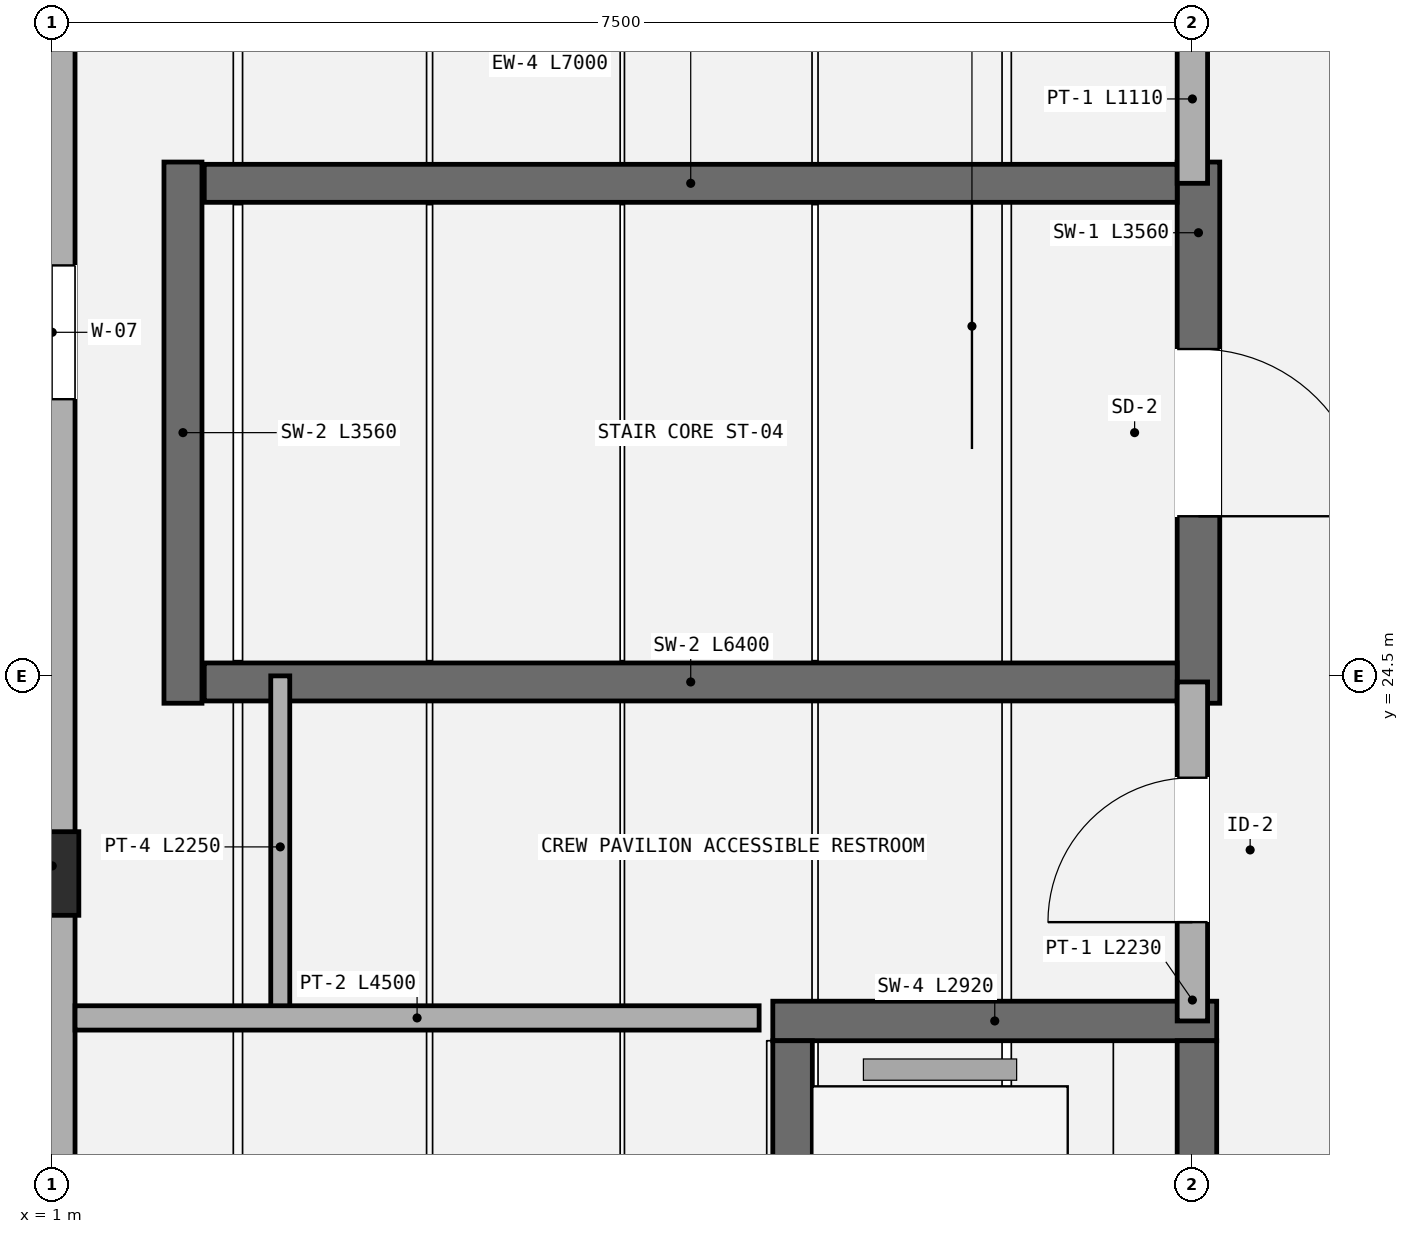
"""IFC4 building model, lengths in metres.
Left out: names, types, materials, properties, quantities, classifications, styles, units other than length and angle.
Written with IfcOpenShell. Run it as: python <this file> out.ifc"""

import sys

from ifc_helpers import new_model, si_unit, direction, frame, frame_2d, origin, origin_2d, place, context, subcontext, project, spatial, rectangle, extrude, element, fill, save


model = new_model("IFC4")
c1 = context("Model", 3, precision=1e-05, world=origin(), true_north=direction((0.0, 1.0)))
c2 = subcontext(c1, "Body", "Model", "MODEL_VIEW")
j1 = project(units=[si_unit("LENGTHUNIT", "METRE"), si_unit("PLANEANGLEUNIT", "RADIAN")], contexts=[c1])
p1 = place(None, origin())
s1 = spatial("IfcSite", under=j1, at=p1, CompositionType="ELEMENT")
p2 = place(p1, origin())
s2 = spatial("IfcBuilding", under=s1, at=p2, CompositionType="ELEMENT")
p3 = place(p2, frame((0.0, 0.0, 12.75)))
s3 = spatial("IfcBuildingStorey", under=s2, at=p3, CompositionType="ELEMENT", Elevation=12.75)
p4 = place(p3, frame((1.0, 23.2, 0.0), z_axis=(0.0, 0.0, 1.0), x_axis=(1.0, 0.0, 0.0)))
e1 = element("IfcColumn", 1, at=p4, inside=s3, PredefinedType="PILASTER", context=c2, shape_type="SweptSolid", body=[
    extrude(rectangle(XDim=0.35, YDim=0.55, at=origin_2d()), origin(), (0.0, 0.0, 1.0), 2.9),
])
p5 = place(p3, frame((1.0, 28.75, 0.0), z_axis=(0.0, 0.0, 1.0), x_axis=(0.0, -1.0, 0.0)))
e2 = element("IfcWall", 2, at=p5, inside=s3, PredefinedType="STANDARD", context=c2, shape_type="SweptSolid", body=[
    extrude(rectangle(XDim=11.0, YDim=0.3, at=frame_2d((5.5, 0.0))), origin(), (0.0, 0.0, 1.0), 2.25),
])
p6 = place(p5, frame((1.55, 0.0, 0.51)))
e3 = element("IfcOpeningElement", 3, at=p6, cuts=e2, PredefinedType="OPENING", context=c2, shape_type="SweptSolid", body=[
    extrude(rectangle(XDim=0.88, YDim=1.5, at=frame_2d((0.44, 0.75))), frame((0.0, 0.16, 0.0), z_axis=(0.0, -1.0, 0.0), x_axis=(1.0, 0.0, 0.0)), (0.0, 0.0, 1.0), 0.32),
])
p7 = place(p5, frame((8.25, 0.0, 0.61)))
e4 = element("IfcOpeningElement", 4, at=p7, cuts=e2, PredefinedType="OPENING", context=c2, shape_type="SweptSolid", body=[
    extrude(rectangle(XDim=1.3, YDim=1.4, at=frame_2d((0.65, 0.7))), frame((0.0, 0.16, 0.0), z_axis=(0.0, -1.0, 0.0), x_axis=(1.0, 0.0, 0.0)), (0.0, 0.0, 1.0), 0.32),
])
p8 = place(p3, frame((8.54, 27.88, 0.0), z_axis=(0.0, 0.0, 1.0), x_axis=(0.0, -1.0, 0.0)))
e5 = element("IfcWall", 5, at=p8, inside=s3, PredefinedType="SHEAR", context=c2, shape_type="SweptSolid", body=[
    extrude(rectangle(XDim=3.56, YDim=0.28, at=frame_2d((1.78, 0.0))), origin(), (0.0, 0.0, 1.0), 2.8),
])
p9 = place(p8, frame((1.23, 0.0, 0.0)))
e6 = element("IfcOpeningElement", 6, at=p9, cuts=e5, PredefinedType="OPENING", context=c2, shape_type="SweptSolid", body=[
    extrude(rectangle(XDim=1.1, YDim=2.15, at=frame_2d((0.55, 1.075))), frame((0.0, 0.15, 0.0), z_axis=(0.0, -1.0, 0.0), x_axis=(1.0, 0.0, 0.0)), (0.0, 0.0, 1.0), 0.3),
])
p10 = place(p3, frame((1.86, 24.32, 0.0), z_axis=(0.0, 0.0, 1.0), x_axis=(0.0, 1.0, 0.0)))
e7 = element("IfcWall", 7, at=p10, inside=s3, PredefinedType="SHEAR", context=c2, shape_type="SweptSolid", body=[
    extrude(rectangle(XDim=3.56, YDim=0.25, at=frame_2d((1.78, 0.0))), origin(), (0.0, 0.0, 1.0), 2.8),
])
for number, where, z_axis, x_axis in (
    (8, (8.4, 27.74, 0.0), (0.0, 0.0, 1.0), (-1.0, 0.0, 0.0)),
    (9, (2.0, 24.46, 0.0), (0.0, 0.0, 1.0), (1.0, 0.0, 0.0)),
):
    element("IfcWall", number, at=place(p3, frame(where, z_axis=z_axis, x_axis=x_axis)), inside=s3, PredefinedType="SHEAR", context=c2, shape_type="SweptSolid", body=[
        extrude(rectangle(XDim=6.4, YDim=0.25, at=frame_2d((3.2, 0.0))), origin(), (0.0, 0.0, 1.0), 2.8),
    ])
p11 = place(p3, frame((8.66, 22.23, 0.0), z_axis=(0.0, 0.0, 1.0), x_axis=(-1.0, 0.0, 0.0)))
e10 = element("IfcWall", 10, at=p11, inside=s3, PredefinedType="SHEAR", context=c2, shape_type="SweptSolid", body=[
    extrude(rectangle(XDim=2.92, YDim=0.26, at=frame_2d((1.46, 0.0))), origin(), (0.0, 0.0, 1.0), 2.8),
])
p12 = place(p3, frame((5.87, 22.1, 0.0), z_axis=(0.0, 0.0, 1.0), x_axis=(0.0, -1.0, 0.0)))
e11 = element("IfcWall", 11, at=p12, inside=s3, PredefinedType="SHEAR", context=c2, shape_type="SweptSolid", body=[
    extrude(rectangle(XDim=3.0, YDim=0.26, at=frame_2d((1.5, 0.0))), origin(), (0.0, 0.0, 1.0), 2.8),
])
p13 = place(p3, frame((8.53, 19.1, 0.0), z_axis=(0.0, 0.0, 1.0), x_axis=(0.0, 1.0, 0.0)))
e12 = element("IfcWall", 12, at=p13, inside=s3, PredefinedType="SHEAR", context=c2, shape_type="SweptSolid", body=[
    extrude(rectangle(XDim=3.0, YDim=0.26, at=frame_2d((1.5, 0.0))), origin(), (0.0, 0.0, 1.0), 2.8),
])
p14 = place(p13, frame((0.95, 0.0, 0.0)))
e13 = element("IfcOpeningElement", 13, at=p14, cuts=e12, PredefinedType="OPENING", context=c2, shape_type="SweptSolid", body=[
    extrude(rectangle(XDim=1.1, YDim=2.15, at=frame_2d((0.55, 1.075))), frame((0.0, 0.14, 0.0), z_axis=(0.0, -1.0, 0.0), x_axis=(1.0, 0.0, 0.0)), (0.0, 0.0, 1.0), 0.28),
])
p15 = place(p3, frame((8.5, 22.23, 0.0), z_axis=(0.0, 0.0, 1.0), x_axis=(0.0, 1.0, 0.0)))
e14 = element("IfcWall", 14, at=p15, inside=s3, PredefinedType="PARTITIONING", context=c2, shape_type="SweptSolid", body=[
    extrude(rectangle(XDim=2.23, YDim=0.2, at=frame_2d((1.115, 0.0))), origin(), (0.0, 0.0, 1.0), 2.15),
])
p16 = place(p15, frame((0.65, 0.0, 0.0)))
e15 = element("IfcOpeningElement", 15, at=p16, cuts=e14, PredefinedType="OPENING", context=c2, shape_type="SweptSolid", body=[
    extrude(rectangle(XDim=0.95, YDim=2.1, at=frame_2d((0.475, 1.05))), frame((0.0, 0.11, 0.0), z_axis=(0.0, -1.0, 0.0), x_axis=(1.0, 0.0, 0.0)), (0.0, 0.0, 1.0), 0.22),
])
p17 = place(p3, frame((8.5, 27.74, 0.0), z_axis=(0.0, 0.0, 1.0), x_axis=(0.0, 1.0, 0.0)))
e16 = element("IfcWall", 16, at=p17, inside=s3, PredefinedType="PARTITIONING", context=c2, shape_type="SweptSolid", body=[
    extrude(rectangle(XDim=1.11, YDim=0.2, at=frame_2d((0.555, 0.0))), origin(), (0.0, 0.0, 1.0), 2.15),
])
p18 = place(p3, frame((2.5, 22.25, 0.0), z_axis=(0.0, 0.0, 1.0), x_axis=(0.0, 1.0, 0.0)))
e17 = element("IfcWall", 17, at=p18, inside=s3, PredefinedType="PARTITIONING", context=c2, shape_type="SweptSolid", body=[
    extrude(rectangle(XDim=2.25, YDim=0.125, at=frame_2d((1.125, 0.0))), origin(), (0.0, 0.0, 1.0), 2.15),
])
p19 = place(p3, frame((1.15, 22.25, 0.0), z_axis=(0.0, 0.0, 1.0), x_axis=(1.0, 0.0, 0.0)))
e18 = element("IfcWall", 18, at=p19, inside=s3, PredefinedType="PARTITIONING", context=c2, shape_type="SweptSolid", body=[
    extrude(rectangle(XDim=4.5, YDim=0.16, at=frame_2d((2.25, 0.0))), origin(), (0.0, 0.0, 1.0), 2.15),
])
p20 = place(p6, origin())
e19 = element("IfcWindow", 19, at=p20, inside=s3, PartitioningType="SINGLE_PANEL", PredefinedType="WINDOW", context=c2, shape_type="SweptSolid", body=[
    extrude(rectangle(XDim=0.88, YDim=1.5, at=frame_2d((0.44, 0.75))), frame((0.0, 0.03, 0.0), z_axis=(0.0, -1.0, 0.0), x_axis=(1.0, 0.0, 0.0)), (0.0, 0.0, 1.0), 0.06),
])
fill(e3, e19)
p21 = place(p9, origin())
e20 = element("IfcDoor", 20, at=p21, inside=s3, OperationType="SINGLE_SWING_RIGHT", PredefinedType="DOOR", context=c2, shape_type="SweptSolid", body=[
    extrude(rectangle(XDim=1.1, YDim=2.15, at=frame_2d((0.55, 1.075))), frame((0.0, 0.025, 0.0), z_axis=(0.0, -1.0, 0.0), x_axis=(1.0, 0.0, 0.0)), (0.0, 0.0, 1.0), 0.05),
])
fill(e6, e20)
p22 = place(p16, origin())
e21 = element("IfcDoor", 21, at=p22, inside=s3, OperationType="SINGLE_SWING_LEFT", PredefinedType="DOOR", context=c2, shape_type="SweptSolid", body=[
    extrude(rectangle(XDim=0.95, YDim=2.1, at=frame_2d((0.475, 1.05))), frame((0.0, 0.025, 0.0), z_axis=(0.0, -1.0, 0.0), x_axis=(1.0, 0.0, 0.0)), (0.0, 0.0, 1.0), 0.05),
])
fill(e15, e21)
save(model, sys.argv[1])
